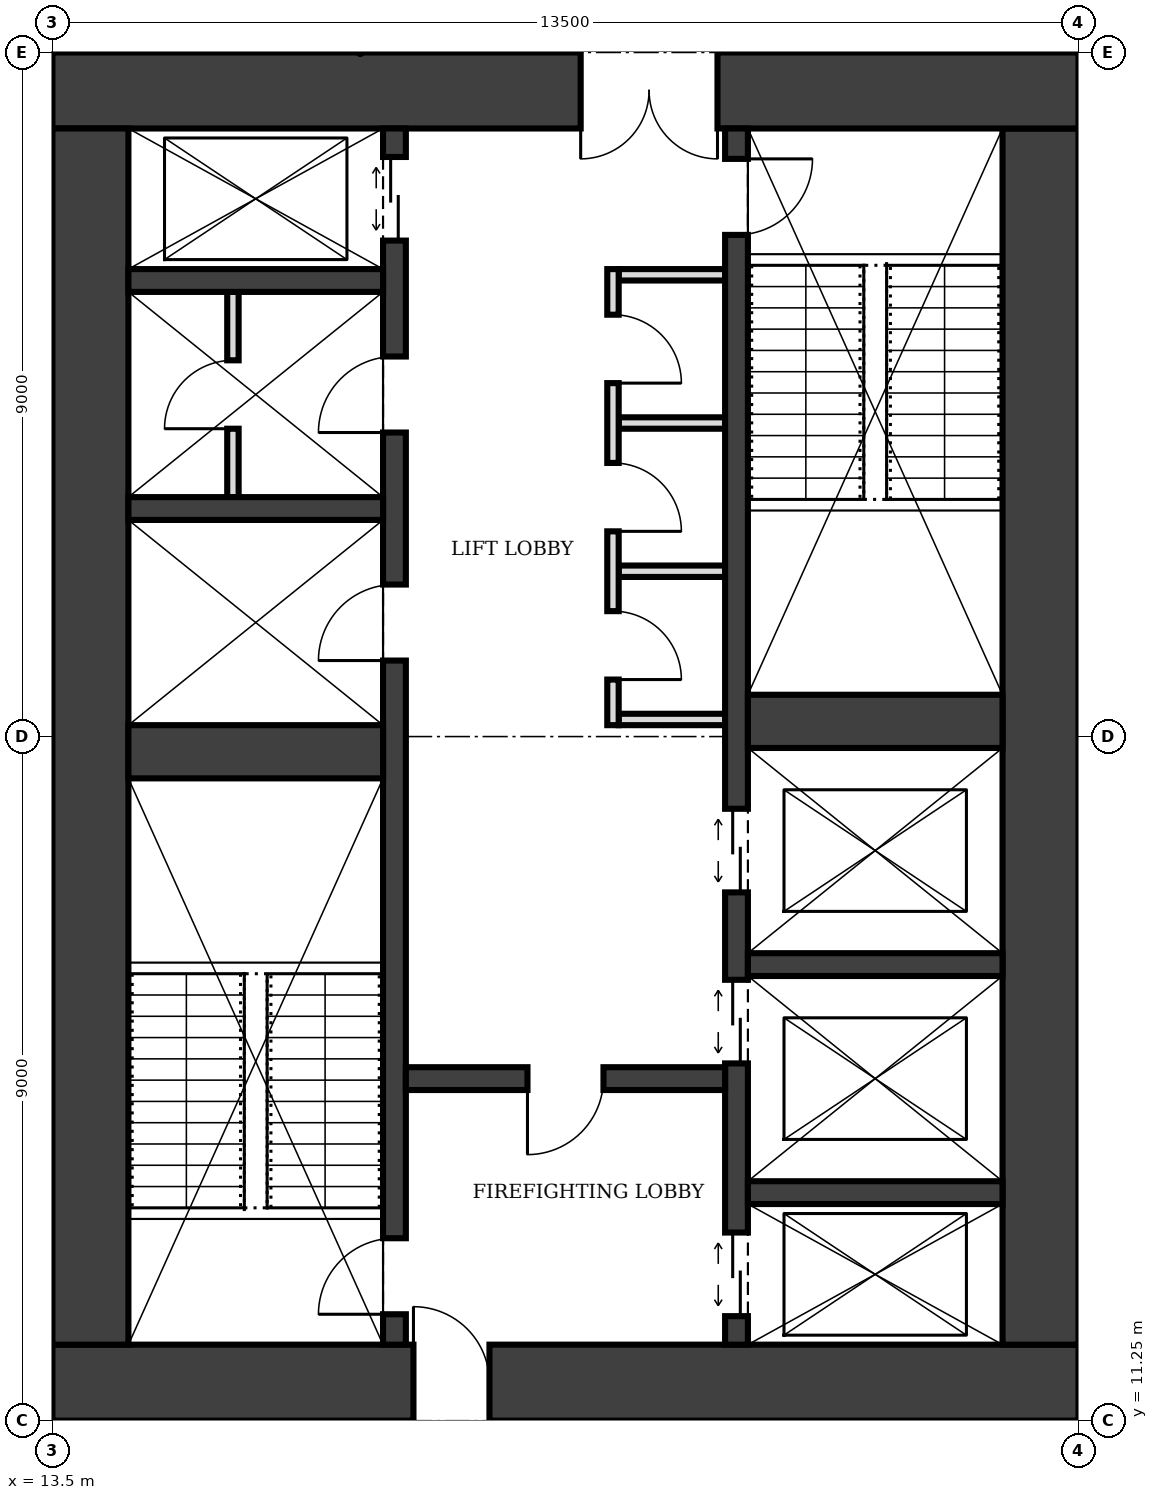
"""IFC4 building model, lengths in metres.
Left out: names, types, materials, properties, quantities, classifications, styles, units other than length and angle.
Written with IfcOpenShell. Run it as: python <this file> out.ifc"""

import sys

from ifc_helpers import new_model, si_unit, direction, frame, frame_2d, origin, place, context, subcontext, project, spatial, rectangle, extrude, element, fill, save


model = new_model("IFC4")
c1 = context("Model", 3, precision=1e-05, world=origin(), true_north=direction((0.0, 1.0)))
c2 = subcontext(c1, "Body", "Model", "MODEL_VIEW")
j1 = project(units=[si_unit("LENGTHUNIT", "METRE"), si_unit("PLANEANGLEUNIT", "RADIAN")], contexts=[c1])
p1 = place(None, origin())
s1 = spatial("IfcSite", under=j1, at=p1, CompositionType="ELEMENT")
p2 = place(p1, origin())
s2 = spatial("IfcBuilding", under=s1, at=p2, CompositionType="ELEMENT")
p3 = place(p2, frame((0.0, 0.0, 289.0)))
s3 = spatial("IfcBuildingStorey", under=s2, at=p3, CompositionType="ELEMENT", Elevation=289.0)
p4 = place(p3, frame((13.5, 11.75, 0.0), z_axis=(0.0, 0.0, 1.0), x_axis=(1.0, 0.0, 0.0)))
e1 = element("IfcWall", 1, at=p4, inside=s3, PredefinedType="SHEAR", context=c2, shape_type="SweptSolid", body=[
    extrude(rectangle(XDim=13.5, YDim=1.0, at=frame_2d((6.75, 0.0))), origin(), (0.0, 0.0, 1.0), 4.0),
])
p5 = place(p4, frame((4.75, 0.0, 0.0)))
e2 = element("IfcOpeningElement", 2, at=p5, cuts=e1, PredefinedType="OPENING", context=c2, shape_type="SweptSolid", body=[
    extrude(rectangle(XDim=1.0, YDim=2.1, at=frame_2d((0.5, 1.05))), frame((0.0, 0.51, 0.0), z_axis=(0.0, -1.0, 0.0), x_axis=(1.0, 0.0, 0.0)), (0.0, 0.0, 1.0), 1.02),
])
p6 = place(p3, frame((26.5, 12.25, 0.0), z_axis=(0.0, 0.0, 1.0), x_axis=(0.0, 1.0, 0.0)))
e3 = element("IfcWall", 3, at=p6, inside=s3, PredefinedType="SHEAR", context=c2, shape_type="SweptSolid", body=[
    extrude(rectangle(XDim=16.0, YDim=1.0, at=frame_2d((8.0, 0.0))), origin(), (0.0, 0.0, 1.0), 4.0),
])
p7 = place(p3, frame((27.0, 28.75, 0.0), z_axis=(0.0, 0.0, 1.0), x_axis=(-1.0, 0.0, 0.0)))
e4 = element("IfcWall", 4, at=p7, inside=s3, PredefinedType="SHEAR", context=c2, shape_type="SweptSolid", body=[
    extrude(rectangle(XDim=13.5, YDim=1.0, at=frame_2d((6.75, 0.0))), origin(), (0.0, 0.0, 1.0), 4.0),
])
p8 = place(p7, frame((4.75, 0.0, 0.0)))
e5 = element("IfcOpeningElement", 5, at=p8, cuts=e4, PredefinedType="OPENING", context=c2, shape_type="SweptSolid", body=[
    extrude(rectangle(XDim=1.8, YDim=2.1, at=frame_2d((0.9, 1.05))), frame((0.0, 0.51, 0.0), z_axis=(0.0, -1.0, 0.0), x_axis=(1.0, 0.0, 0.0)), (0.0, 0.0, 1.0), 1.02),
])
p9 = place(p3, frame((14.0, 28.25, 0.0), z_axis=(0.0, 0.0, 1.0), x_axis=(0.0, -1.0, 0.0)))
e6 = element("IfcWall", 6, at=p9, inside=s3, PredefinedType="SHEAR", context=c2, shape_type="SweptSolid", body=[
    extrude(rectangle(XDim=16.0, YDim=1.0, at=frame_2d((8.0, 0.0))), origin(), (0.0, 0.0, 1.0), 4.0),
])
p10 = place(p3, frame((18.0, 12.25, 0.0), z_axis=(0.0, 0.0, 1.0), x_axis=(0.0, 1.0, 0.0)))
e7 = element("IfcWall", 7, at=p10, inside=s3, PredefinedType="SHEAR", context=c2, shape_type="SweptSolid", body=[
    extrude(rectangle(XDim=16.0, YDim=0.3, at=frame_2d((8.0, 0.0))), origin(), (0.0, 0.0, 1.0), 4.0),
])
p11 = place(p10, frame((0.4, 0.0, 0.0)))
e8 = element("IfcOpeningElement", 8, at=p11, cuts=e7, PredefinedType="OPENING", context=c2, shape_type="SweptSolid", body=[
    extrude(rectangle(XDim=1.0, YDim=2.1, at=frame_2d((0.5, 1.05))), frame((0.0, 0.16, 0.0), z_axis=(0.0, -1.0, 0.0), x_axis=(1.0, 0.0, 0.0)), (0.0, 0.0, 1.0), 0.32),
])
p12 = place(p10, frame((14.525, 0.0, 0.0)))
e9 = element("IfcOpeningElement", 9, at=p12, cuts=e7, PredefinedType="OPENING", context=c2, shape_type="SweptSolid", body=[
    extrude(rectangle(XDim=1.1, YDim=2.1, at=frame_2d((0.55, 1.05))), frame((0.0, 0.16, 0.0), z_axis=(0.0, -1.0, 0.0), x_axis=(1.0, 0.0, 0.0)), (0.0, 0.0, 1.0), 0.32),
])
p13 = place(p10, frame((9.0, 0.0, 0.0)))
e10 = element("IfcOpeningElement", 10, at=p13, cuts=e7, PredefinedType="OPENING", context=c2, shape_type="SweptSolid", body=[
    extrude(rectangle(XDim=1.0, YDim=2.1, at=frame_2d((0.5, 1.05))), frame((0.0, 0.16, 0.0), z_axis=(0.0, -1.0, 0.0), x_axis=(1.0, 0.0, 0.0)), (0.0, 0.0, 1.0), 0.32),
])
p14 = place(p10, frame((12.0, 0.0, 0.0)))
e11 = element("IfcOpeningElement", 11, at=p14, cuts=e7, PredefinedType="OPENING", context=c2, shape_type="SweptSolid", body=[
    extrude(rectangle(XDim=1.0, YDim=2.1, at=frame_2d((0.5, 1.05))), frame((0.0, 0.16, 0.0), z_axis=(0.0, -1.0, 0.0), x_axis=(1.0, 0.0, 0.0)), (0.0, 0.0, 1.0), 0.32),
])
p15 = place(p3, frame((22.5, 12.25, 0.0), z_axis=(0.0, 0.0, 1.0), x_axis=(0.0, 1.0, 0.0)))
e12 = element("IfcWall", 12, at=p15, inside=s3, PredefinedType="SHEAR", context=c2, shape_type="SweptSolid", body=[
    extrude(rectangle(XDim=16.0, YDim=0.3, at=frame_2d((8.0, 0.0))), origin(), (0.0, 0.0, 1.0), 4.0),
])
p16 = place(p15, frame((14.6, 0.0, 0.0)))
e13 = element("IfcOpeningElement", 13, at=p16, cuts=e12, PredefinedType="OPENING", context=c2, shape_type="SweptSolid", body=[
    extrude(rectangle(XDim=1.0, YDim=2.1, at=frame_2d((0.5, 1.05))), frame((0.0, 0.16, 0.0), z_axis=(0.0, -1.0, 0.0), x_axis=(1.0, 0.0, 0.0)), (0.0, 0.0, 1.0), 0.32),
])
p17 = place(p15, frame((0.375, 0.0, 0.0)))
e14 = element("IfcOpeningElement", 14, at=p17, cuts=e12, PredefinedType="OPENING", context=c2, shape_type="SweptSolid", body=[
    extrude(rectangle(XDim=1.1, YDim=2.1, at=frame_2d((0.55, 1.05))), frame((0.0, 0.16, 0.0), z_axis=(0.0, -1.0, 0.0), x_axis=(1.0, 0.0, 0.0)), (0.0, 0.0, 1.0), 0.32),
])
p18 = place(p15, frame((3.7, 0.0, 0.0)))
e15 = element("IfcOpeningElement", 15, at=p18, cuts=e12, PredefinedType="OPENING", context=c2, shape_type="SweptSolid", body=[
    extrude(rectangle(XDim=1.1, YDim=2.1, at=frame_2d((0.55, 1.05))), frame((0.0, 0.16, 0.0), z_axis=(0.0, -1.0, 0.0), x_axis=(1.0, 0.0, 0.0)), (0.0, 0.0, 1.0), 0.32),
])
p19 = place(p15, frame((5.95, 0.0, 0.0)))
e16 = element("IfcOpeningElement", 16, at=p19, cuts=e12, PredefinedType="OPENING", context=c2, shape_type="SweptSolid", body=[
    extrude(rectangle(XDim=1.1, YDim=2.1, at=frame_2d((0.55, 1.05))), frame((0.0, 0.16, 0.0), z_axis=(0.0, -1.0, 0.0), x_axis=(1.0, 0.0, 0.0)), (0.0, 0.0, 1.0), 0.32),
])
p20 = place(p3, frame((14.5, 20.05, 0.0), z_axis=(0.0, 0.0, 1.0), x_axis=(1.0, 0.0, 0.0)))
e17 = element("IfcWall", 17, at=p20, inside=s3, PredefinedType="SHEAR", context=c2, shape_type="SweptSolid", body=[
    extrude(rectangle(XDim=3.35, YDim=0.7, at=frame_2d((1.675, 0.0))), origin(), (0.0, 0.0, 1.0), 4.0),
])
p21 = place(p3, frame((18.15, 15.75, 0.0), z_axis=(0.0, 0.0, 1.0), x_axis=(1.0, 0.0, 0.0)))
e18 = element("IfcWall", 18, at=p21, inside=s3, PredefinedType="SHEAR", context=c2, shape_type="SweptSolid", body=[
    extrude(rectangle(XDim=4.2, YDim=0.3, at=frame_2d((2.1, 0.0))), origin(), (0.0, 0.0, 1.0), 4.0),
])
p22 = place(p21, frame((1.6, 0.0, 0.0)))
e19 = element("IfcOpeningElement", 19, at=p22, cuts=e18, PredefinedType="OPENING", context=c2, shape_type="SweptSolid", body=[
    extrude(rectangle(XDim=1.0, YDim=2.1, at=frame_2d((0.5, 1.05))), frame((0.0, 0.16, 0.0), z_axis=(0.0, -1.0, 0.0), x_axis=(1.0, 0.0, 0.0)), (0.0, 0.0, 1.0), 0.32),
])
for number, where, z_axis, x_axis in (
    (20, (22.65, 14.25, 0.0), (0.0, 0.0, 1.0), (1.0, 0.0, 0.0)),
    (21, (22.65, 17.25, 0.0), (0.0, 0.0, 1.0), (1.0, 0.0, 0.0)),
):
    element("IfcWall", number, at=place(p3, frame(where, z_axis=z_axis, x_axis=x_axis)), inside=s3, PredefinedType="SHEAR", context=c2, shape_type="SweptSolid", body=[
        extrude(rectangle(XDim=3.35, YDim=0.3, at=frame_2d((1.675, 0.0))), origin(), (0.0, 0.0, 1.0), 4.0),
    ])
p23 = place(p3, frame((22.65, 20.45, 0.0), z_axis=(0.0, 0.0, 1.0), x_axis=(1.0, 0.0, 0.0)))
e22 = element("IfcWall", 22, at=p23, inside=s3, PredefinedType="SHEAR", context=c2, shape_type="SweptSolid", body=[
    extrude(rectangle(XDim=3.35, YDim=0.7, at=frame_2d((1.675, 0.0))), origin(), (0.0, 0.0, 1.0), 4.0),
])
for number, where, z_axis, x_axis in (
    (23, (14.5, 23.25, 0.0), (0.0, 0.0, 1.0), (1.0, 0.0, 0.0)),
    (24, (14.5, 26.25, 0.0), (0.0, 0.0, 1.0), (1.0, 0.0, 0.0)),
):
    element("IfcWall", number, at=place(p3, frame(where, z_axis=z_axis, x_axis=x_axis)), inside=s3, PredefinedType="SHEAR", context=c2, shape_type="SweptSolid", body=[
        extrude(rectangle(XDim=3.35, YDim=0.3, at=frame_2d((1.675, 0.0))), origin(), (0.0, 0.0, 1.0), 4.0),
    ])
p24 = place(p3, frame((20.875, 20.4, 0.0), z_axis=(0.0, 0.0, 1.0), x_axis=(0.0, 1.0, 0.0)))
e25 = element("IfcWall", 25, at=p24, inside=s3, PredefinedType="PARTITIONING", context=c2, shape_type="SweptSolid", body=[
    extrude(rectangle(XDim=6.0, YDim=0.15, at=frame_2d((3.0, 0.0))), origin(), (0.0, 0.0, 1.0), 3.75),
])
p25 = place(p24, frame((0.6, 0.0, 0.0)))
e26 = element("IfcOpeningElement", 26, at=p25, cuts=e25, PredefinedType="OPENING", context=c2, shape_type="SweptSolid", body=[
    extrude(rectangle(XDim=0.9, YDim=2.1, at=frame_2d((0.45, 1.05))), frame((0.0, 0.085, 0.0), z_axis=(0.0, -1.0, 0.0), x_axis=(1.0, 0.0, 0.0)), (0.0, 0.0, 1.0), 0.17),
])
p26 = place(p24, frame((2.55, 0.0, 0.0)))
e27 = element("IfcOpeningElement", 27, at=p26, cuts=e25, PredefinedType="OPENING", context=c2, shape_type="SweptSolid", body=[
    extrude(rectangle(XDim=0.9, YDim=2.1, at=frame_2d((0.45, 1.05))), frame((0.0, 0.085, 0.0), z_axis=(0.0, -1.0, 0.0), x_axis=(1.0, 0.0, 0.0)), (0.0, 0.0, 1.0), 0.17),
])
p27 = place(p24, frame((4.5, 0.0, 0.0)))
e28 = element("IfcOpeningElement", 28, at=p27, cuts=e25, PredefinedType="OPENING", context=c2, shape_type="SweptSolid", body=[
    extrude(rectangle(XDim=0.9, YDim=2.1, at=frame_2d((0.45, 1.05))), frame((0.0, 0.085, 0.0), z_axis=(0.0, -1.0, 0.0), x_axis=(1.0, 0.0, 0.0)), (0.0, 0.0, 1.0), 0.17),
])
for number, where, z_axis, x_axis in (
    (29, (20.95, 20.475, 0.0), (0.0, 0.0, 1.0), (1.0, 0.0, 0.0)),
    (30, (20.95, 22.425, 0.0), (0.0, 0.0, 1.0), (1.0, 0.0, 0.0)),
    (31, (20.95, 24.375, 0.0), (0.0, 0.0, 1.0), (1.0, 0.0, 0.0)),
    (32, (20.95, 26.325, 0.0), (0.0, 0.0, 1.0), (1.0, 0.0, 0.0)),
):
    element("IfcWall", number, at=place(p3, frame(where, z_axis=z_axis, x_axis=x_axis)), inside=s3, PredefinedType="PARTITIONING", context=c2, shape_type="SweptSolid", body=[
        extrude(rectangle(XDim=1.4, YDim=0.15, at=frame_2d((0.7, 0.0))), origin(), (0.0, 0.0, 1.0), 3.75),
    ])
p28 = place(p3, frame((15.875, 23.4, 0.0), z_axis=(0.0, 0.0, 1.0), x_axis=(0.0, 1.0, 0.0)))
e33 = element("IfcWall", 33, at=p28, inside=s3, PredefinedType="PARTITIONING", context=c2, shape_type="SweptSolid", body=[
    extrude(rectangle(XDim=2.7, YDim=0.15, at=frame_2d((1.35, 0.0))), origin(), (0.0, 0.0, 1.0), 3.75),
])
p29 = place(p28, frame((0.9, 0.0, 0.0)))
e34 = element("IfcOpeningElement", 34, at=p29, cuts=e33, PredefinedType="OPENING", context=c2, shape_type="SweptSolid", body=[
    extrude(rectangle(XDim=0.9, YDim=2.1, at=frame_2d((0.45, 1.05))), frame((0.0, 0.085, 0.0), z_axis=(0.0, -1.0, 0.0), x_axis=(1.0, 0.0, 0.0)), (0.0, 0.0, 1.0), 0.17),
])
p30 = place(p5, origin())
e35 = element("IfcDoor", 35, at=p30, inside=s3, OperationType="SINGLE_SWING_LEFT", PredefinedType="DOOR", context=c2, shape_type="SweptSolid", body=[
    extrude(rectangle(XDim=1.0, YDim=2.1, at=frame_2d((0.5, 1.05))), frame((0.0, 0.025, 0.0), z_axis=(0.0, -1.0, 0.0), x_axis=(1.0, 0.0, 0.0)), (0.0, 0.0, 1.0), 0.05),
])
fill(e2, e35)
p31 = place(p8, origin())
e36 = element("IfcDoor", 36, at=p31, inside=s3, OperationType="DOUBLE_DOOR_SINGLE_SWING", PredefinedType="DOOR", context=c2, shape_type="SweptSolid", body=[
    extrude(rectangle(XDim=1.8, YDim=2.1, at=frame_2d((0.9, 1.05))), frame((0.0, 0.025, 0.0), z_axis=(0.0, -1.0, 0.0), x_axis=(1.0, 0.0, 0.0)), (0.0, 0.0, 1.0), 0.05),
])
fill(e5, e36)
p32 = place(p22, frame((1.0, 0.0, 0.0), z_axis=(0.0, 0.0, 1.0), x_axis=(-1.0, 0.0, 0.0)))
e37 = element("IfcDoor", 37, at=p32, inside=s3, OperationType="SINGLE_SWING_RIGHT", PredefinedType="DOOR", context=c2, shape_type="SweptSolid", body=[
    extrude(rectangle(XDim=1.0, YDim=2.1, at=frame_2d((0.5, 1.05))), frame((0.0, 0.025, 0.0), z_axis=(0.0, -1.0, 0.0), x_axis=(1.0, 0.0, 0.0)), (0.0, 0.0, 1.0), 0.05),
])
fill(e19, e37)
p33 = place(p11, origin())
e38 = element("IfcDoor", 38, at=p33, inside=s3, OperationType="SINGLE_SWING_LEFT", PredefinedType="DOOR", context=c2, shape_type="SweptSolid", body=[
    extrude(rectangle(XDim=1.0, YDim=2.1, at=frame_2d((0.5, 1.05))), frame((0.0, 0.025, 0.0), z_axis=(0.0, -1.0, 0.0), x_axis=(1.0, 0.0, 0.0)), (0.0, 0.0, 1.0), 0.05),
])
fill(e8, e38)
p34 = place(p16, frame((1.0, 0.0, 0.0), z_axis=(0.0, 0.0, 1.0), x_axis=(-1.0, 0.0, 0.0)))
e39 = element("IfcDoor", 39, at=p34, inside=s3, OperationType="SINGLE_SWING_LEFT", PredefinedType="DOOR", context=c2, shape_type="SweptSolid", body=[
    extrude(rectangle(XDim=1.0, YDim=2.1, at=frame_2d((0.5, 1.05))), frame((0.0, 0.025, 0.0), z_axis=(0.0, -1.0, 0.0), x_axis=(1.0, 0.0, 0.0)), (0.0, 0.0, 1.0), 0.05),
])
fill(e13, e39)
p35 = place(p17, origin())
e40 = element("IfcDoor", 40, at=p35, inside=s3, OperationType="DOUBLE_DOOR_SLIDING", PredefinedType="DOOR", context=c2, shape_type="SweptSolid", body=[
    extrude(rectangle(XDim=1.1, YDim=2.1, at=frame_2d((0.55, 1.05))), frame((0.0, 0.025, 0.0), z_axis=(0.0, -1.0, 0.0), x_axis=(1.0, 0.0, 0.0)), (0.0, 0.0, 1.0), 0.05),
])
fill(e14, e40)
p36 = place(p12, origin())
e41 = element("IfcDoor", 41, at=p36, inside=s3, OperationType="DOUBLE_DOOR_SLIDING", PredefinedType="DOOR", context=c2, shape_type="SweptSolid", body=[
    extrude(rectangle(XDim=1.1, YDim=2.1, at=frame_2d((0.55, 1.05))), frame((0.0, 0.025, 0.0), z_axis=(0.0, -1.0, 0.0), x_axis=(1.0, 0.0, 0.0)), (0.0, 0.0, 1.0), 0.05),
])
fill(e9, e41)
p37 = place(p18, origin())
e42 = element("IfcDoor", 42, at=p37, inside=s3, OperationType="DOUBLE_DOOR_SLIDING", PredefinedType="DOOR", context=c2, shape_type="SweptSolid", body=[
    extrude(rectangle(XDim=1.1, YDim=2.1, at=frame_2d((0.55, 1.05))), frame((0.0, 0.025, 0.0), z_axis=(0.0, -1.0, 0.0), x_axis=(1.0, 0.0, 0.0)), (0.0, 0.0, 1.0), 0.05),
])
fill(e15, e42)
p38 = place(p19, origin())
e43 = element("IfcDoor", 43, at=p38, inside=s3, OperationType="DOUBLE_DOOR_SLIDING", PredefinedType="DOOR", context=c2, shape_type="SweptSolid", body=[
    extrude(rectangle(XDim=1.1, YDim=2.1, at=frame_2d((0.55, 1.05))), frame((0.0, 0.025, 0.0), z_axis=(0.0, -1.0, 0.0), x_axis=(1.0, 0.0, 0.0)), (0.0, 0.0, 1.0), 0.05),
])
fill(e16, e43)
p39 = place(p25, frame((0.9, 0.0, 0.0), z_axis=(0.0, 0.0, 1.0), x_axis=(-1.0, 0.0, 0.0)))
e44 = element("IfcDoor", 44, at=p39, inside=s3, OperationType="SINGLE_SWING_RIGHT", PredefinedType="DOOR", context=c2, shape_type="SweptSolid", body=[
    extrude(rectangle(XDim=0.9, YDim=2.1, at=frame_2d((0.45, 1.05))), frame((0.0, 0.025, 0.0), z_axis=(0.0, -1.0, 0.0), x_axis=(1.0, 0.0, 0.0)), (0.0, 0.0, 1.0), 0.05),
])
fill(e26, e44)
p40 = place(p26, frame((0.9, 0.0, 0.0), z_axis=(0.0, 0.0, 1.0), x_axis=(-1.0, 0.0, 0.0)))
e45 = element("IfcDoor", 45, at=p40, inside=s3, OperationType="SINGLE_SWING_RIGHT", PredefinedType="DOOR", context=c2, shape_type="SweptSolid", body=[
    extrude(rectangle(XDim=0.9, YDim=2.1, at=frame_2d((0.45, 1.05))), frame((0.0, 0.025, 0.0), z_axis=(0.0, -1.0, 0.0), x_axis=(1.0, 0.0, 0.0)), (0.0, 0.0, 1.0), 0.05),
])
fill(e27, e45)
p41 = place(p27, frame((0.9, 0.0, 0.0), z_axis=(0.0, 0.0, 1.0), x_axis=(-1.0, 0.0, 0.0)))
e46 = element("IfcDoor", 46, at=p41, inside=s3, OperationType="SINGLE_SWING_RIGHT", PredefinedType="DOOR", context=c2, shape_type="SweptSolid", body=[
    extrude(rectangle(XDim=0.9, YDim=2.1, at=frame_2d((0.45, 1.05))), frame((0.0, 0.025, 0.0), z_axis=(0.0, -1.0, 0.0), x_axis=(1.0, 0.0, 0.0)), (0.0, 0.0, 1.0), 0.05),
])
fill(e28, e46)
p42 = place(p13, origin())
e47 = element("IfcDoor", 47, at=p42, inside=s3, OperationType="SINGLE_SWING_LEFT", PredefinedType="DOOR", context=c2, shape_type="SweptSolid", body=[
    extrude(rectangle(XDim=1.0, YDim=2.1, at=frame_2d((0.5, 1.05))), frame((0.0, 0.025, 0.0), z_axis=(0.0, -1.0, 0.0), x_axis=(1.0, 0.0, 0.0)), (0.0, 0.0, 1.0), 0.05),
])
fill(e10, e47)
p43 = place(p14, origin())
e48 = element("IfcDoor", 48, at=p43, inside=s3, OperationType="SINGLE_SWING_LEFT", PredefinedType="DOOR", context=c2, shape_type="SweptSolid", body=[
    extrude(rectangle(XDim=1.0, YDim=2.1, at=frame_2d((0.5, 1.05))), frame((0.0, 0.025, 0.0), z_axis=(0.0, -1.0, 0.0), x_axis=(1.0, 0.0, 0.0)), (0.0, 0.0, 1.0), 0.05),
])
fill(e11, e48)
p44 = place(p29, origin())
e49 = element("IfcDoor", 49, at=p44, inside=s3, OperationType="SINGLE_SWING_LEFT", PredefinedType="DOOR", context=c2, shape_type="SweptSolid", body=[
    extrude(rectangle(XDim=0.9, YDim=2.1, at=frame_2d((0.45, 1.05))), frame((0.0, 0.025, 0.0), z_axis=(0.0, -1.0, 0.0), x_axis=(1.0, 0.0, 0.0)), (0.0, 0.0, 1.0), 0.05),
])
fill(e34, e49)
save(model, sys.argv[1])
